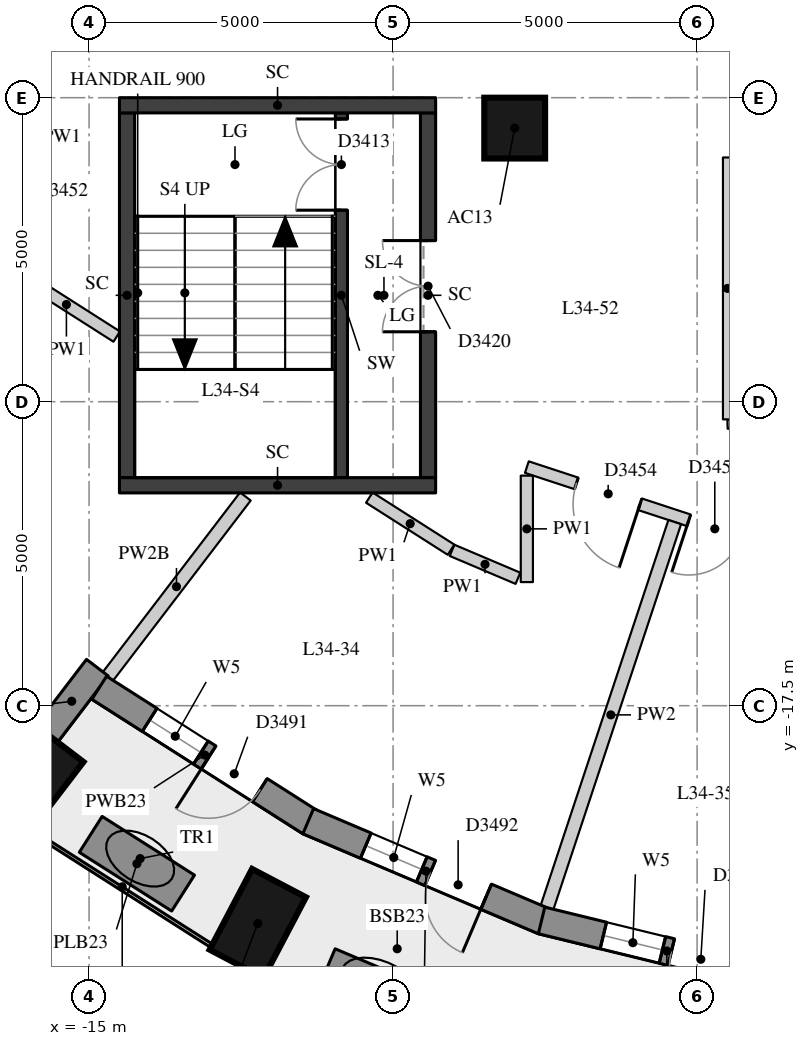
"""IFC4 building model, lengths in metres.
Left out: names, types, materials, properties, quantities, classifications, styles, units other than length and angle.
Written with IfcOpenShell. Run it as: python <this file> out.ifc"""

import sys

from ifc_helpers import new_model, si_unit, direction, frame, frame_2d, origin, origin_2d, place, context, subcontext, project, spatial, rectangle, extrude, element, fill, save


model = new_model("IFC4")
c1 = context("Model", 3, precision=1e-05, world=origin(), true_north=direction((0.0, 1.0)))
c2 = subcontext(c1, "Body", "Model", "MODEL_VIEW")
j1 = project(units=[si_unit("LENGTHUNIT", "METRE"), si_unit("PLANEANGLEUNIT", "RADIAN")], contexts=[c1])
p1 = place(None, origin())
s1 = spatial("IfcSite", under=j1, at=p1, CompositionType="ELEMENT")
p2 = place(p1, origin())
s2 = spatial("IfcBuilding", under=s1, at=p2, CompositionType="ELEMENT")
p3 = place(p2, frame((0.0, 0.0, 121.9)))
s3 = spatial("IfcBuildingStorey", under=s2, at=p3, CompositionType="ELEMENT", Elevation=121.9)
for number, where, z_axis, x_axis in (
    (1, (-15.945, -18.717, 0.0), (0.0, 0.0, 1.0), (-0.607, -0.795, 0.0)),
    (2, (-12.225, -21.082, 0.0), (0.0, 0.0, 1.0), (-0.465, -0.885, 0.0)),
):
    element("IfcColumn", number, at=place(p3, frame(where, z_axis=z_axis, x_axis=x_axis)), inside=s3, PredefinedType="COLUMN", context=c2, shape_type="SweptSolid", body=[
        extrude(rectangle(XDim=1.5, YDim=1.0, at=origin_2d()), origin(), (0.0, 0.0, 1.0), 3.3),
    ])
p4 = place(p3, frame((-8.0, -8.0, 0.0), z_axis=(0.0, 0.0, 1.0), x_axis=(1.0, 0.0, 0.0)))
e3 = element("IfcColumn", 3, at=p4, inside=s3, PredefinedType="COLUMN", context=c2, shape_type="SweptSolid", body=[
    extrude(rectangle(XDim=1.0, YDim=1.0, at=origin_2d()), origin(), (0.0, 0.0, 1.0), 3.3),
])
p5 = place(p3, frame((-15.708, -17.979, 0.0), z_axis=(0.0, 0.0, 1.0), x_axis=(0.607026495834, 0.794681592435, 0.0)))
e4 = element("IfcWall", 4, at=p5, inside=s3, PredefinedType="SOLIDWALL", context=c2, shape_type="SweptSolid", body=[
    extrude(rectangle(XDim=1.391, YDim=0.45, at=frame_2d((0.695, 0.0))), origin(), (0.0, 0.0, 1.0), 2.57),
])
p6 = place(p3, frame((-14.833, -17.205, 0.0), z_axis=(0.0, 0.0, 1.0), x_axis=(0.843255766903, -0.537512522259, 0.0)))
e5 = element("IfcWall", 5, at=p6, inside=s3, PredefinedType="SOLIDWALL", context=c2, shape_type="SweptSolid", body=[
    extrude(rectangle(XDim=4.115, YDim=0.45, at=frame_2d((2.058, 0.0))), origin(), (0.0, 0.0, 1.0), 3.02),
])
p7 = place(p6, frame((0.983, 0.0, 0.4)))
e6 = element("IfcOpeningElement", 6, at=p7, cuts=e5, PredefinedType="OPENING", context=c2, shape_type="SweptSolid", body=[
    extrude(rectangle(XDim=1.0, YDim=1.75, at=frame_2d((0.5, 0.875))), frame((0.0, 0.235, 0.0), z_axis=(0.0, -1.0, 0.0), x_axis=(1.0, 0.0, 0.0)), (0.0, 0.0, 1.0), 0.47),
])
p8 = place(p6, frame((2.133, 0.0, 0.0)))
e7 = element("IfcOpeningElement", 7, at=p8, cuts=e5, PredefinedType="OPENING", context=c2, shape_type="SweptSolid", body=[
    extrude(rectangle(XDim=1.0, YDim=2.15, at=frame_2d((0.5, 1.075))), frame((0.0, 0.235, 0.0), z_axis=(0.0, -1.0, 0.0), x_axis=(1.0, 0.0, 0.0)), (0.0, 0.0, 1.0), 0.47),
])
p9 = place(p3, frame((-11.396, -19.399, 0.0), z_axis=(0.0, 0.0, 1.0), x_axis=(0.920496400713, -0.390751041296, 0.0)))
e8 = element("IfcWall", 8, at=p9, inside=s3, PredefinedType="SOLIDWALL", context=c2, shape_type="SweptSolid", body=[
    extrude(rectangle(XDim=4.207, YDim=0.45, at=frame_2d((2.104, 0.0))), origin(), (0.0, 0.0, 1.0), 3.02),
])
p10 = place(p9, frame((1.028, 0.0, 0.4)))
e9 = element("IfcOpeningElement", 9, at=p10, cuts=e8, PredefinedType="OPENING", context=c2, shape_type="SweptSolid", body=[
    extrude(rectangle(XDim=1.0, YDim=1.75, at=frame_2d((0.5, 0.875))), frame((0.0, 0.235, 0.0), z_axis=(0.0, -1.0, 0.0), x_axis=(1.0, 0.0, 0.0)), (0.0, 0.0, 1.0), 0.47),
])
p11 = place(p9, frame((2.178, 0.0, 0.0)))
e10 = element("IfcOpeningElement", 10, at=p11, cuts=e8, PredefinedType="OPENING", context=c2, shape_type="SweptSolid", body=[
    extrude(rectangle(XDim=1.0, YDim=2.15, at=frame_2d((0.5, 1.075))), frame((0.0, 0.235, 0.0), z_axis=(0.0, -1.0, 0.0), x_axis=(1.0, 0.0, 0.0)), (0.0, 0.0, 1.0), 0.47),
])
p12 = place(p3, frame((-7.558, -21.032, 0.0), z_axis=(0.0, 0.0, 1.0), x_axis=(0.971511611373, -0.23699195971, 0.0)))
e11 = element("IfcWall", 11, at=p12, inside=s3, PredefinedType="SOLIDWALL", context=c2, shape_type="SweptSolid", body=[
    extrude(rectangle(XDim=4.241, YDim=0.45, at=frame_2d((2.121, 0.0))), origin(), (0.0, 0.0, 1.0), 3.02),
])
p13 = place(p12, frame((1.046, 0.0, 0.4)))
e12 = element("IfcOpeningElement", 12, at=p13, cuts=e11, PredefinedType="OPENING", context=c2, shape_type="SweptSolid", body=[
    extrude(rectangle(XDim=1.0, YDim=1.75, at=frame_2d((0.5, 0.875))), frame((0.0, 0.235, 0.0), z_axis=(0.0, -1.0, 0.0), x_axis=(1.0, 0.0, 0.0)), (0.0, 0.0, 1.0), 0.47),
])
p14 = place(p12, frame((2.196, 0.0, 0.0)))
e13 = element("IfcOpeningElement", 13, at=p14, cuts=e11, PredefinedType="OPENING", context=c2, shape_type="SweptSolid", body=[
    extrude(rectangle(XDim=1.0, YDim=2.15, at=frame_2d((0.5, 1.075))), frame((0.0, 0.235, 0.0), z_axis=(0.0, -1.0, 0.0), x_axis=(1.0, 0.0, 0.0)), (0.0, 0.0, 1.0), 0.47),
])
for number, where, z_axis, x_axis in (
    (14, (-14.973, -19.616, 0.0), (0.0, 0.0, 1.0), (0.844, -0.537, 0.0)),
    (15, (-11.09, -21.82, 0.0), (0.0, 0.0, 1.0), (0.921, -0.39, 0.0)),
):
    element("IfcWall", number, at=place(p3, frame(where, z_axis=z_axis, x_axis=x_axis)), inside=s3, PredefinedType="USERDEFINED", context=c2, shape_type="SweptSolid", body=[
        extrude(rectangle(XDim=1.8, YDim=0.7, at=frame_2d((0.9, 0.0))), origin(), (0.0, 0.0, 1.0), 0.75),
    ])
p15 = place(p3, frame((-10.85, -13.75, 0.0), z_axis=(0.0, 0.0, 1.0), x_axis=(0.0, 1.0, 0.0)))
e16 = element("IfcWall", 16, at=p15, inside=s3, PredefinedType="SHEAR", context=c2, shape_type="SweptSolid", body=[
    extrude(rectangle(XDim=6.0, YDim=0.2, at=frame_2d((3.0, 0.0))), origin(), (0.0, 0.0, 1.0), 3.02),
])
p16 = place(p15, frame((4.4, 0.0, 0.0)))
e17 = element("IfcOpeningElement", 17, at=p16, cuts=e16, PredefinedType="OPENING", context=c2, shape_type="SweptSolid", body=[
    extrude(rectangle(XDim=1.5, YDim=2.1, at=frame_2d((0.75, 1.05))), frame((0.0, 0.11, 0.0), z_axis=(0.0, -1.0, 0.0), x_axis=(1.0, 0.0, 0.0)), (0.0, 0.0, 1.0), 0.22),
])
p17 = place(p3, frame((-14.375, -13.75, -0.28), z_axis=(0.0, 0.0, 1.0), x_axis=(0.0, 1.0, 0.0)))
e18 = element("IfcWall", 18, at=p17, inside=s3, PredefinedType="SHEAR", context=c2, shape_type="SweptSolid", body=[
    extrude(rectangle(XDim=6.0, YDim=0.25, at=frame_2d((3.0, 0.0))), origin(), (0.0, 0.0, 1.0), 3.3),
])
p18 = place(p3, frame((-9.425, -13.75, -0.28), z_axis=(0.0, 0.0, 1.0), x_axis=(0.0, 1.0, 0.0)))
e19 = element("IfcWall", 19, at=p18, inside=s3, PredefinedType="SHEAR", context=c2, shape_type="SweptSolid", body=[
    extrude(rectangle(XDim=6.0, YDim=0.25, at=frame_2d((3.0, 0.0))), origin(), (0.0, 0.0, 1.0), 3.3),
])
p19 = place(p18, frame((2.4, 0.0, 0.28)))
e20 = element("IfcOpeningElement", 20, at=p19, cuts=e19, PredefinedType="OPENING", context=c2, shape_type="SweptSolid", body=[
    extrude(rectangle(XDim=1.5, YDim=2.1, at=frame_2d((0.75, 1.05))), frame((0.0, 0.135, 0.0), z_axis=(0.0, -1.0, 0.0), x_axis=(1.0, 0.0, 0.0)), (0.0, 0.0, 1.0), 0.27),
])
for number, where, z_axis, x_axis in (
    (21, (-14.5, -7.625, -0.28), (0.0, 0.0, 1.0), (1.0, 0.0, 0.0)),
    (22, (-14.5, -13.875, -0.28), (0.0, 0.0, 1.0), (1.0, 0.0, 0.0)),
):
    element("IfcWall", number, at=place(p3, frame(where, z_axis=z_axis, x_axis=x_axis)), inside=s3, PredefinedType="SHEAR", context=c2, shape_type="SweptSolid", body=[
        extrude(rectangle(XDim=5.2, YDim=0.25, at=frame_2d((2.6, 0.0))), origin(), (0.0, 0.0, 1.0), 3.3),
    ])
p20 = place(p3, frame((-14.545, -11.429, 0.0), z_axis=(0.0, 0.0, 1.0), x_axis=(-0.843261732334, 0.537503163507, 0.0)))
e23 = element("IfcWall", 23, at=p20, inside=s3, PredefinedType="PARTITIONING", context=c2, shape_type="SweptSolid", body=[
    extrude(rectangle(XDim=1.963, YDim=0.2, at=frame_2d((0.981, 0.0))), origin(), (0.0, 0.0, 1.0), 3.02),
])
p21 = place(p3, frame((0.705, -16.368, 0.0), z_axis=(0.0, 0.0, 1.0), x_axis=(-0.95010544032, 0.311928921832, 0.0)))
e24 = element("IfcWall", 24, at=p21, inside=s3, PredefinedType="PARTITIONING", context=c2, shape_type="SweptSolid", body=[
    extrude(rectangle(XDim=8.951, YDim=0.2, at=frame_2d((4.476, 0.0))), origin(), (0.0, 0.0, 1.0), 2.57),
])
p22 = place(p21, frame((6.993, 0.0, 0.0)))
e25 = element("IfcOpeningElement", 25, at=p22, cuts=e24, PredefinedType="OPENING", context=c2, shape_type="SweptSolid", body=[
    extrude(rectangle(XDim=1.1, YDim=2.1, at=frame_2d((0.55, 1.05))), frame((0.0, 0.11, 0.0), z_axis=(0.0, -1.0, 0.0), x_axis=(1.0, 0.0, 0.0)), (0.0, 0.0, 1.0), 0.22),
])
p23 = place(p21, frame((5.248, 0.0, 0.0)))
e26 = element("IfcOpeningElement", 26, at=p23, cuts=e24, PredefinedType="OPENING", context=c2, shape_type="SweptSolid", body=[
    extrude(rectangle(XDim=0.9, YDim=2.1, at=frame_2d((0.45, 1.05))), frame((0.0, 0.11, 0.0), z_axis=(0.0, -1.0, 0.0), x_axis=(1.0, 0.0, 0.0)), (0.0, 0.0, 1.0), 0.22),
])
p24 = place(p21, frame((1.688, 0.0, 0.0)))
e27 = element("IfcOpeningElement", 27, at=p24, cuts=e24, PredefinedType="OPENING", context=c2, shape_type="SweptSolid", body=[
    extrude(rectangle(XDim=1.0, YDim=2.1, at=frame_2d((0.5, 1.05))), frame((0.0, 0.11, 0.0), z_axis=(0.0, -1.0, 0.0), x_axis=(1.0, 0.0, 0.0)), (0.0, 0.0, 1.0), 0.22),
])
p25 = place(p3, frame((-7.8, -13.716, 0.0), z_axis=(0.0, 0.0, 1.0), x_axis=(0.0, -1.0, 0.0)))
e28 = element("IfcWall", 28, at=p25, inside=s3, PredefinedType="PARTITIONING", context=c2, shape_type="SweptSolid", body=[
    extrude(rectangle(XDim=1.751, YDim=0.2, at=frame_2d((0.875, 0.0))), origin(), (0.0, 0.0, 1.0), 3.02),
])
p26 = place(p3, frame((-7.947, -15.404, 0.0), z_axis=(0.0, 0.0, 1.0), x_axis=(-0.920608906038, 0.390485905153, 0.0)))
e29 = element("IfcWall", 29, at=p26, inside=s3, PredefinedType="PARTITIONING", context=c2, shape_type="SweptSolid", body=[
    extrude(rectangle(XDim=1.177, YDim=0.2, at=frame_2d((0.588, 0.0))), origin(), (0.0, 0.0, 1.0), 3.02),
])
p27 = place(p3, frame((-9.047, -14.934, 0.0), z_axis=(0.0, 0.0, 1.0), x_axis=(-0.843232404468, 0.537549171755, 0.0)))
e30 = element("IfcWall", 30, at=p27, inside=s3, PredefinedType="PARTITIONING", context=c2, shape_type="SweptSolid", body=[
    extrude(rectangle(XDim=1.594, YDim=0.2, at=frame_2d((0.797, 0.0))), origin(), (0.0, 0.0, 1.0), 3.02),
])
p28 = place(p3, frame((-2.596, -12.823, 0.0), z_axis=(0.0, 0.0, 1.0), x_axis=(-0.999684436087, -0.025120275573, 0.0)))
e31 = element("IfcWall", 31, at=p28, inside=s3, PredefinedType="PARTITIONING", context=c2, shape_type="SweptSolid", body=[
    extrude(rectangle(XDim=1.905, YDim=0.15, at=frame_2d((0.952, 0.0))), origin(), (0.0, 0.0, 1.0), 3.02),
])
p29 = place(p3, frame((-4.5, -12.79, 0.0), z_axis=(0.0, 0.0, 1.0), x_axis=(0.0, 1.0, 0.0)))
e32 = element("IfcWall", 32, at=p29, inside=s3, PredefinedType="PARTITIONING", context=c2, shape_type="SweptSolid", body=[
    extrude(rectangle(XDim=4.307, YDim=0.15, at=frame_2d((2.154, 0.0))), origin(), (0.0, 0.0, 1.0), 3.02),
])
p30 = place(p3, frame((-14.696, -17.025, 0.0), z_axis=(0.0, 0.0, 1.0), x_axis=(0.607059278405, 0.794656550028, 0.0)))
e33 = element("IfcWall", 33, at=p30, inside=s3, PredefinedType="PARTITIONING", context=c2, shape_type="SweptSolid", body=[
    extrude(rectangle(XDim=3.734, YDim=0.22, at=frame_2d((1.867, 0.0))), origin(), (0.0, 0.0, 1.0), 2.57),
])
p31 = place(p3, frame((-7.469, -20.822, 0.0), z_axis=(0.0, 0.0, 1.0), x_axis=(0.314560923857, 0.949237286026, 0.0)))
e34 = element("IfcWall", 34, at=p31, inside=s3, PredefinedType="PARTITIONING", context=c2, shape_type="SweptSolid", body=[
    extrude(rectangle(XDim=6.681, YDim=0.22, at=frame_2d((3.34, 0.0))), origin(), (0.0, 0.0, 1.0), 3.02),
])
p32 = place(p7, origin())
e35 = element("IfcWindow", 35, at=p32, inside=s3, PartitioningType="SINGLE_PANEL", PredefinedType="WINDOW", context=c2, shape_type="SweptSolid", body=[
    extrude(rectangle(XDim=1.0, YDim=1.75, at=frame_2d((0.5, 0.875))), frame((0.0, 0.035, 0.0), z_axis=(0.0, -1.0, 0.0), x_axis=(1.0, 0.0, 0.0)), (0.0, 0.0, 1.0), 0.06),
])
fill(e6, e35)
p33 = place(p8, frame((1.0, 0.0, 0.0), z_axis=(0.0, 0.0, 1.0), x_axis=(-1.0, 0.0, 0.0)))
e36 = element("IfcDoor", 36, at=p33, inside=s3, OperationType="SINGLE_SWING_RIGHT", PredefinedType="DOOR", context=c2, shape_type="SweptSolid", body=[
    extrude(rectangle(XDim=1.0, YDim=2.15, at=frame_2d((0.5, 1.075))), frame((0.0, 0.075, 0.0), z_axis=(0.0, -1.0, 0.0), x_axis=(1.0, 0.0, 0.0)), (0.0, 0.0, 1.0), 0.05),
])
fill(e7, e36)
p34 = place(p10, origin())
e37 = element("IfcWindow", 37, at=p34, inside=s3, PartitioningType="SINGLE_PANEL", PredefinedType="WINDOW", context=c2, shape_type="SweptSolid", body=[
    extrude(rectangle(XDim=1.0, YDim=1.75, at=frame_2d((0.5, 0.875))), frame((0.0, 0.035, 0.0), z_axis=(0.0, -1.0, 0.0), x_axis=(1.0, 0.0, 0.0)), (0.0, 0.0, 1.0), 0.06),
])
fill(e9, e37)
p35 = place(p11, frame((1.0, 0.0, 0.0), z_axis=(0.0, 0.0, 1.0), x_axis=(-1.0, 0.0, 0.0)))
e38 = element("IfcDoor", 38, at=p35, inside=s3, OperationType="SINGLE_SWING_LEFT", PredefinedType="DOOR", context=c2, shape_type="SweptSolid", body=[
    extrude(rectangle(XDim=1.0, YDim=2.15, at=frame_2d((0.5, 1.075))), frame((0.0, 0.075, 0.0), z_axis=(0.0, -1.0, 0.0), x_axis=(1.0, 0.0, 0.0)), (0.0, 0.0, 1.0), 0.05),
])
fill(e10, e38)
p36 = place(p13, origin())
e39 = element("IfcWindow", 39, at=p36, inside=s3, PartitioningType="SINGLE_PANEL", PredefinedType="WINDOW", context=c2, shape_type="SweptSolid", body=[
    extrude(rectangle(XDim=1.0, YDim=1.75, at=frame_2d((0.5, 0.875))), frame((0.0, 0.035, 0.0), z_axis=(0.0, -1.0, 0.0), x_axis=(1.0, 0.0, 0.0)), (0.0, 0.0, 1.0), 0.06),
])
fill(e12, e39)
p37 = place(p14, frame((1.0, 0.0, 0.0), z_axis=(0.0, 0.0, 1.0), x_axis=(-1.0, 0.0, 0.0)))
e40 = element("IfcDoor", 40, at=p37, inside=s3, OperationType="SINGLE_SWING_LEFT", PredefinedType="DOOR", context=c2, shape_type="SweptSolid", body=[
    extrude(rectangle(XDim=1.0, YDim=2.15, at=frame_2d((0.5, 1.075))), frame((0.0, 0.075, 0.0), z_axis=(0.0, -1.0, 0.0), x_axis=(1.0, 0.0, 0.0)), (0.0, 0.0, 1.0), 0.05),
])
fill(e13, e40)
p38 = place(p16, origin())
e41 = element("IfcDoor", 41, at=p38, inside=s3, OperationType="DOUBLE_DOOR_SINGLE_SWING", PredefinedType="DOOR", context=c2, shape_type="SweptSolid", body=[
    extrude(rectangle(XDim=1.5, YDim=2.1, at=frame_2d((0.75, 1.05))), frame((0.0, 0.025, 0.0), z_axis=(0.0, -1.0, 0.0), x_axis=(1.0, 0.0, 0.0)), (0.0, 0.0, 1.0), 0.05),
])
fill(e17, e41)
p39 = place(p19, origin())
e42 = element("IfcDoor", 42, at=p39, inside=s3, OperationType="DOUBLE_DOOR_SINGLE_SWING", PredefinedType="DOOR", context=c2, shape_type="SweptSolid", body=[
    extrude(rectangle(XDim=1.5, YDim=2.1, at=frame_2d((0.75, 1.05))), frame((0.0, 0.025, 0.0), z_axis=(0.0, -1.0, 0.0), x_axis=(1.0, 0.0, 0.0)), (0.0, 0.0, 1.0), 0.05),
])
fill(e20, e42)
p40 = place(p22, origin())
e43 = element("IfcDoor", 43, at=p40, inside=s3, OperationType="SINGLE_SWING_LEFT", PredefinedType="DOOR", context=c2, shape_type="SweptSolid", body=[
    extrude(rectangle(XDim=1.1, YDim=2.1, at=frame_2d((0.55, 1.05))), frame((0.0, 0.025, 0.0), z_axis=(0.0, -1.0, 0.0), x_axis=(1.0, 0.0, 0.0)), (0.0, 0.0, 1.0), 0.05),
])
fill(e25, e43)
p41 = place(p23, origin())
e44 = element("IfcDoor", 44, at=p41, inside=s3, OperationType="SINGLE_SWING_RIGHT", PredefinedType="DOOR", context=c2, shape_type="SweptSolid", body=[
    extrude(rectangle(XDim=0.9, YDim=2.1, at=frame_2d((0.45, 1.05))), frame((0.0, 0.025, 0.0), z_axis=(0.0, -1.0, 0.0), x_axis=(1.0, 0.0, 0.0)), (0.0, 0.0, 1.0), 0.05),
])
fill(e26, e44)
save(model, sys.argv[1])
